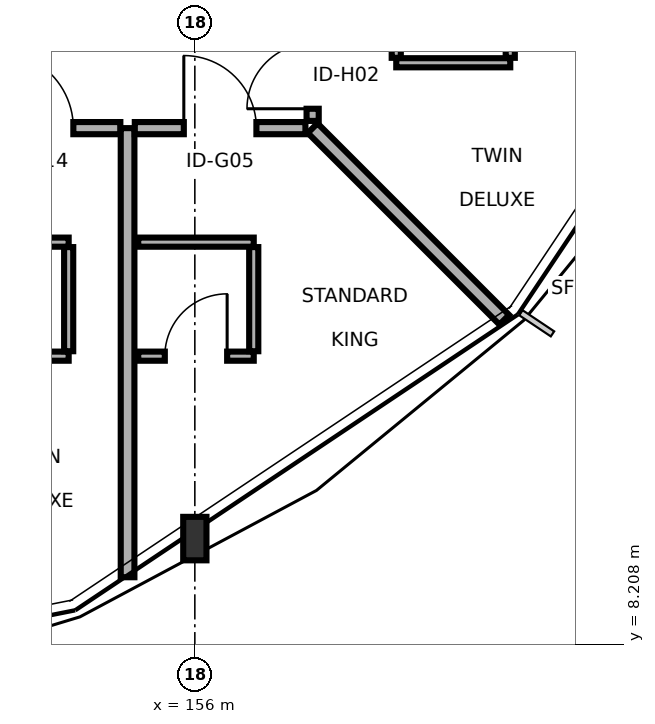
"""IFC4 building model, lengths in metres.
Left out: names, types, materials, properties, quantities, classifications, styles, units other than length and angle.
Written with IfcOpenShell. Run it as: python <this file> out.ifc"""

import sys

from ifc_helpers import new_model, si_unit, direction, frame, frame_2d, origin, origin_2d, place, context, subcontext, project, spatial, rectangle, i_section, extrude, element, fill, save


model = new_model("IFC4")
c1 = context("Model", 3, precision=1e-05, world=origin(), true_north=direction((0.0, 1.0)))
c2 = subcontext(c1, "Body", "Model", "MODEL_VIEW")
j1 = project(units=[si_unit("LENGTHUNIT", "METRE"), si_unit("PLANEANGLEUNIT", "RADIAN")], contexts=[c1])
p1 = place(None, origin())
s1 = spatial("IfcSite", under=j1, at=p1, CompositionType="ELEMENT")
p2 = place(p1, origin())
s2 = spatial("IfcBuilding", under=s1, at=p2, CompositionType="ELEMENT")
p3 = place(p2, frame((0.0, 0.0, 14.7)))
s3 = spatial("IfcBuildingStorey", under=s2, at=p3, CompositionType="ELEMENT", Elevation=14.7)
p4 = place(p3, frame((156.0, 9.6, 0.0), z_axis=(0.0, 0.0, 1.0), x_axis=(1.0, 0.0, 0.0)))
e1 = element("IfcColumn", 1, at=p4, inside=s3, PredefinedType="COLUMN", context=c2, shape_type="SweptSolid", body=[
    extrude(i_section(OverallWidth=0.306, OverallDepth=0.572, WebThickness=0.021, FlangeThickness=0.04, FilletRadius=0.027, at=origin_2d()), origin(), (0.0, 0.0, 1.0), 3.4),
])
p5 = place(p3, frame((152.775, 15.0, 0.0), z_axis=(0.0, 0.0, 1.0), x_axis=(1.0, 0.0, 0.0)))
e2 = element("IfcWall", 2, at=p5, inside=s3, PredefinedType="PARTITIONING", context=c2, shape_type="SweptSolid", body=[
    extrude(rectangle(XDim=2.245, YDim=0.16, at=frame_2d((1.123, 0.0))), origin(), (0.0, 0.0, 1.0), 3.215),
])
p6 = place(p5, frame((0.618, 0.0, 0.0)))
e3 = element("IfcOpeningElement", 3, at=p6, cuts=e2, PredefinedType="OPENING", context=c2, shape_type="SweptSolid", body=[
    extrude(rectangle(XDim=1.008, YDim=2.13, at=frame_2d((0.504, 1.065))), frame((0.0, 0.09, 0.0), z_axis=(0.0, -1.0, 0.0), x_axis=(1.0, 0.0, 0.0)), (0.0, 0.0, 1.0), 0.18),
])
p7 = place(p3, frame((152.82, 12.0, 0.0), z_axis=(0.0, 0.0, 1.0), x_axis=(1.0, 0.0, 0.0)))
e4 = element("IfcWall", 4, at=p7, inside=s3, PredefinedType="PARTITIONING", context=c2, shape_type="SweptSolid", body=[
    extrude(rectangle(XDim=1.52, YDim=0.12, at=frame_2d((0.76, 0.0))), origin(), (0.0, 0.0, 1.0), 3.215),
])
p8 = place(p7, frame((0.35, 0.0, 0.0)))
e5 = element("IfcOpeningElement", 5, at=p8, cuts=e4, PredefinedType="OPENING", context=c2, shape_type="SweptSolid", body=[
    extrude(rectangle(XDim=0.82, YDim=2.08, at=frame_2d((0.41, 1.04))), frame((0.0, 0.07, 0.0), z_axis=(0.0, -1.0, 0.0), x_axis=(1.0, 0.0, 0.0)), (0.0, 0.0, 1.0), 0.14),
])
p9 = place(p3, frame((152.82, 13.5, 0.0), z_axis=(0.0, 0.0, 1.0), x_axis=(1.0, 0.0, 0.0)))
e6 = element("IfcWall", 6, at=p9, inside=s3, PredefinedType="PARTITIONING", context=c2, shape_type="SweptSolid", body=[
    extrude(rectangle(XDim=1.52, YDim=0.12, at=frame_2d((0.76, 0.0))), origin(), (0.0, 0.0, 1.0), 3.215),
])
p10 = place(p3, frame((154.34, 12.065, 0.0), z_axis=(0.0, 0.0, 1.0), x_axis=(0.0, 1.0, 0.0)))
e7 = element("IfcWall", 7, at=p10, inside=s3, PredefinedType="PARTITIONING", context=c2, shape_type="SweptSolid", body=[
    extrude(rectangle(XDim=1.37, YDim=0.12, at=frame_2d((0.685, 0.0))), origin(), (0.0, 0.0, 1.0), 3.215),
])
p11 = place(p3, frame((155.115, 9.092, 0.0), z_axis=(0.0, 0.0, 1.0), x_axis=(0.0, 1.0, 0.0)))
e8 = element("IfcWall", 8, at=p11, inside=s3, PredefinedType="PARTITIONING", context=c2, shape_type="SweptSolid", body=[
    extrude(rectangle(XDim=5.908, YDim=0.18, at=frame_2d((2.954, 0.0))), origin(), (0.0, 0.0, 1.0), 2.76),
])
p12 = place(p3, frame((155.21, 15.0, 0.0), z_axis=(0.0, 0.0, 1.0), x_axis=(1.0, 0.0, 0.0)))
e9 = element("IfcWall", 9, at=p12, inside=s3, PredefinedType="PARTITIONING", context=c2, shape_type="SweptSolid", body=[
    extrude(rectangle(XDim=2.245, YDim=0.16, at=frame_2d((1.123, 0.0))), origin(), (0.0, 0.0, 1.0), 2.75),
])
p13 = place(p12, frame((0.645, 0.0, 0.0)))
e10 = element("IfcOpeningElement", 10, at=p13, cuts=e9, PredefinedType="OPENING", context=c2, shape_type="SweptSolid", body=[
    extrude(rectangle(XDim=0.955, YDim=2.05, at=frame_2d((0.478, 1.025))), frame((0.0, 0.09, 0.0), z_axis=(0.0, -1.0, 0.0), x_axis=(1.0, 0.0, 0.0)), (0.0, 0.0, 1.0), 0.18),
])
p14 = place(p3, frame((155.255, 12.0, 0.0), z_axis=(0.0, 0.0, 1.0), x_axis=(1.0, 0.0, 0.0)))
e11 = element("IfcWall", 11, at=p14, inside=s3, PredefinedType="PARTITIONING", context=c2, shape_type="SweptSolid", body=[
    extrude(rectangle(XDim=1.52, YDim=0.12, at=frame_2d((0.76, 0.0))), origin(), (0.0, 0.0, 1.0), 2.75),
])
p15 = place(p14, frame((0.35, 0.0, 0.0)))
e12 = element("IfcOpeningElement", 12, at=p15, cuts=e11, PredefinedType="OPENING", context=c2, shape_type="SweptSolid", body=[
    extrude(rectangle(XDim=0.82, YDim=2.08, at=frame_2d((0.41, 1.04))), frame((0.0, 0.07, 0.0), z_axis=(0.0, -1.0, 0.0), x_axis=(1.0, 0.0, 0.0)), (0.0, 0.0, 1.0), 0.14),
])
p16 = place(p3, frame((155.255, 13.5, 0.0), z_axis=(0.0, 0.0, 1.0), x_axis=(1.0, 0.0, 0.0)))
e13 = element("IfcWall", 13, at=p16, inside=s3, PredefinedType="PARTITIONING", context=c2, shape_type="SweptSolid", body=[
    extrude(rectangle(XDim=1.52, YDim=0.12, at=frame_2d((0.76, 0.0))), origin(), (0.0, 0.0, 1.0), 2.75),
])
p17 = place(p3, frame((156.775, 12.065, 0.0), z_axis=(0.0, 0.0, 1.0), x_axis=(0.0, 1.0, 0.0)))
e14 = element("IfcWall", 14, at=p17, inside=s3, PredefinedType="PARTITIONING", context=c2, shape_type="SweptSolid", body=[
    extrude(rectangle(XDim=1.37, YDim=0.12, at=frame_2d((0.685, 0.0))), origin(), (0.0, 0.0, 1.0), 3.215),
])
p18 = place(p3, frame((157.55, 15.0, 0.0), z_axis=(0.0, 0.0, 1.0), x_axis=(0.707106781187, -0.707106781187, 0.0)))
e15 = element("IfcWall", 15, at=p18, inside=s3, PredefinedType="PARTITIONING", context=c2, shape_type="SweptSolid", body=[
    extrude(rectangle(XDim=3.565, YDim=0.18, at=frame_2d((1.783, 0.0))), origin(), (0.0, 0.0, 1.0), 2.76),
])
p19 = place(p3, frame((157.55, 15.095, 0.0), z_axis=(0.0, 0.0, 1.0), x_axis=(0.0, 1.0, 0.0)))
e16 = element("IfcWall", 16, at=p19, inside=s3, PredefinedType="PARTITIONING", context=c2, shape_type="SweptSolid", body=[
    extrude(rectangle(XDim=2.33, YDim=0.16, at=frame_2d((1.165, 0.0))), origin(), (0.0, 0.0, 1.0), 2.75),
])
p20 = place(p19, frame((0.16, 0.0, 0.0)))
e17 = element("IfcOpeningElement", 17, at=p20, cuts=e16, PredefinedType="OPENING", context=c2, shape_type="SweptSolid", body=[
    extrude(rectangle(XDim=0.864, YDim=2.13, at=frame_2d((0.432, 1.065))), frame((0.0, 0.09, 0.0), z_axis=(0.0, -1.0, 0.0), x_axis=(1.0, 0.0, 0.0)), (0.0, 0.0, 1.0), 0.18),
])
p21 = place(p3, frame((158.65, 15.86, 0.0), z_axis=(0.0, 0.0, 1.0), x_axis=(1.0, 0.0, 0.0)))
e18 = element("IfcWall", 18, at=p21, inside=s3, PredefinedType="PARTITIONING", context=c2, shape_type="SweptSolid", body=[
    extrude(rectangle(XDim=1.5, YDim=0.12, at=frame_2d((0.75, 0.0))), origin(), (0.0, 0.0, 1.0), 3.215),
])
p22 = place(p3, frame((158.65, 15.925, 0.0), z_axis=(0.0, 0.0, 1.0), x_axis=(0.0, 1.0, 0.0)))
e19 = element("IfcWall", 19, at=p22, inside=s3, PredefinedType="PARTITIONING", context=c2, shape_type="SweptSolid", body=[
    extrude(rectangle(XDim=1.39, YDim=0.12, at=frame_2d((0.695, 0.0))), origin(), (0.0, 0.0, 1.0), 2.75),
])
p23 = place(p3, frame((160.15, 15.925, 0.0), z_axis=(0.0, 0.0, 1.0), x_axis=(0.0, 1.0, 0.0)))
e20 = element("IfcWall", 20, at=p23, inside=s3, PredefinedType="PARTITIONING", context=c2, shape_type="SweptSolid", body=[
    extrude(rectangle(XDim=1.39, YDim=0.12, at=frame_2d((0.695, 0.0))), origin(), (0.0, 0.0, 1.0), 2.75),
])
p24 = place(p23, frame((0.285, 0.0, 0.0)))
e21 = element("IfcOpeningElement", 21, at=p24, cuts=e20, PredefinedType="OPENING", context=c2, shape_type="SweptSolid", body=[
    extrude(rectangle(XDim=0.82, YDim=2.08, at=frame_2d((0.41, 1.04))), frame((0.0, 0.07, 0.0), z_axis=(0.0, -1.0, 0.0), x_axis=(1.0, 0.0, 0.0)), (0.0, 0.0, 1.0), 0.14),
])
p25 = place(p6, origin())
e22 = element("IfcDoor", 22, at=p25, inside=s3, OperationType="SINGLE_SWING_LEFT", PredefinedType="DOOR", context=c2, shape_type="SweptSolid", body=[
    extrude(rectangle(XDim=1.008, YDim=2.13, at=frame_2d((0.504, 1.065))), frame((0.0, 0.025, 0.0), z_axis=(0.0, -1.0, 0.0), x_axis=(1.0, 0.0, 0.0)), (0.0, 0.0, 1.0), 0.05),
])
fill(e3, e22)
p26 = place(p13, origin())
e23 = element("IfcDoor", 23, at=p26, inside=s3, OperationType="SINGLE_SWING_LEFT", PredefinedType="DOOR", context=c2, shape_type="SweptSolid", body=[
    extrude(rectangle(XDim=0.955, YDim=2.05, at=frame_2d((0.478, 1.025))), frame((0.0, 0.025, 0.0), z_axis=(0.0, -1.0, 0.0), x_axis=(1.0, 0.0, 0.0)), (0.0, 0.0, 1.0), 0.05),
])
fill(e10, e23)
p27 = place(p15, origin())
e24 = element("IfcDoor", 24, at=p27, inside=s3, OperationType="SINGLE_SWING_RIGHT", PredefinedType="DOOR", context=c2, shape_type="SweptSolid", body=[
    extrude(rectangle(XDim=0.82, YDim=2.08, at=frame_2d((0.41, 1.04))), frame((0.0, 0.025, 0.0), z_axis=(0.0, -1.0, 0.0), x_axis=(1.0, 0.0, 0.0)), (0.0, 0.0, 1.0), 0.05),
])
fill(e12, e24)
p28 = place(p20, origin())
e25 = element("IfcDoor", 25, at=p28, inside=s3, OperationType="SINGLE_SWING_LEFT", PredefinedType="DOOR", context=c2, shape_type="SweptSolid", body=[
    extrude(rectangle(XDim=0.864, YDim=2.13, at=frame_2d((0.432, 1.065))), frame((0.0, 0.025, 0.0), z_axis=(0.0, -1.0, 0.0), x_axis=(1.0, 0.0, 0.0)), (0.0, 0.0, 1.0), 0.05),
])
fill(e17, e25)
save(model, sys.argv[1])
